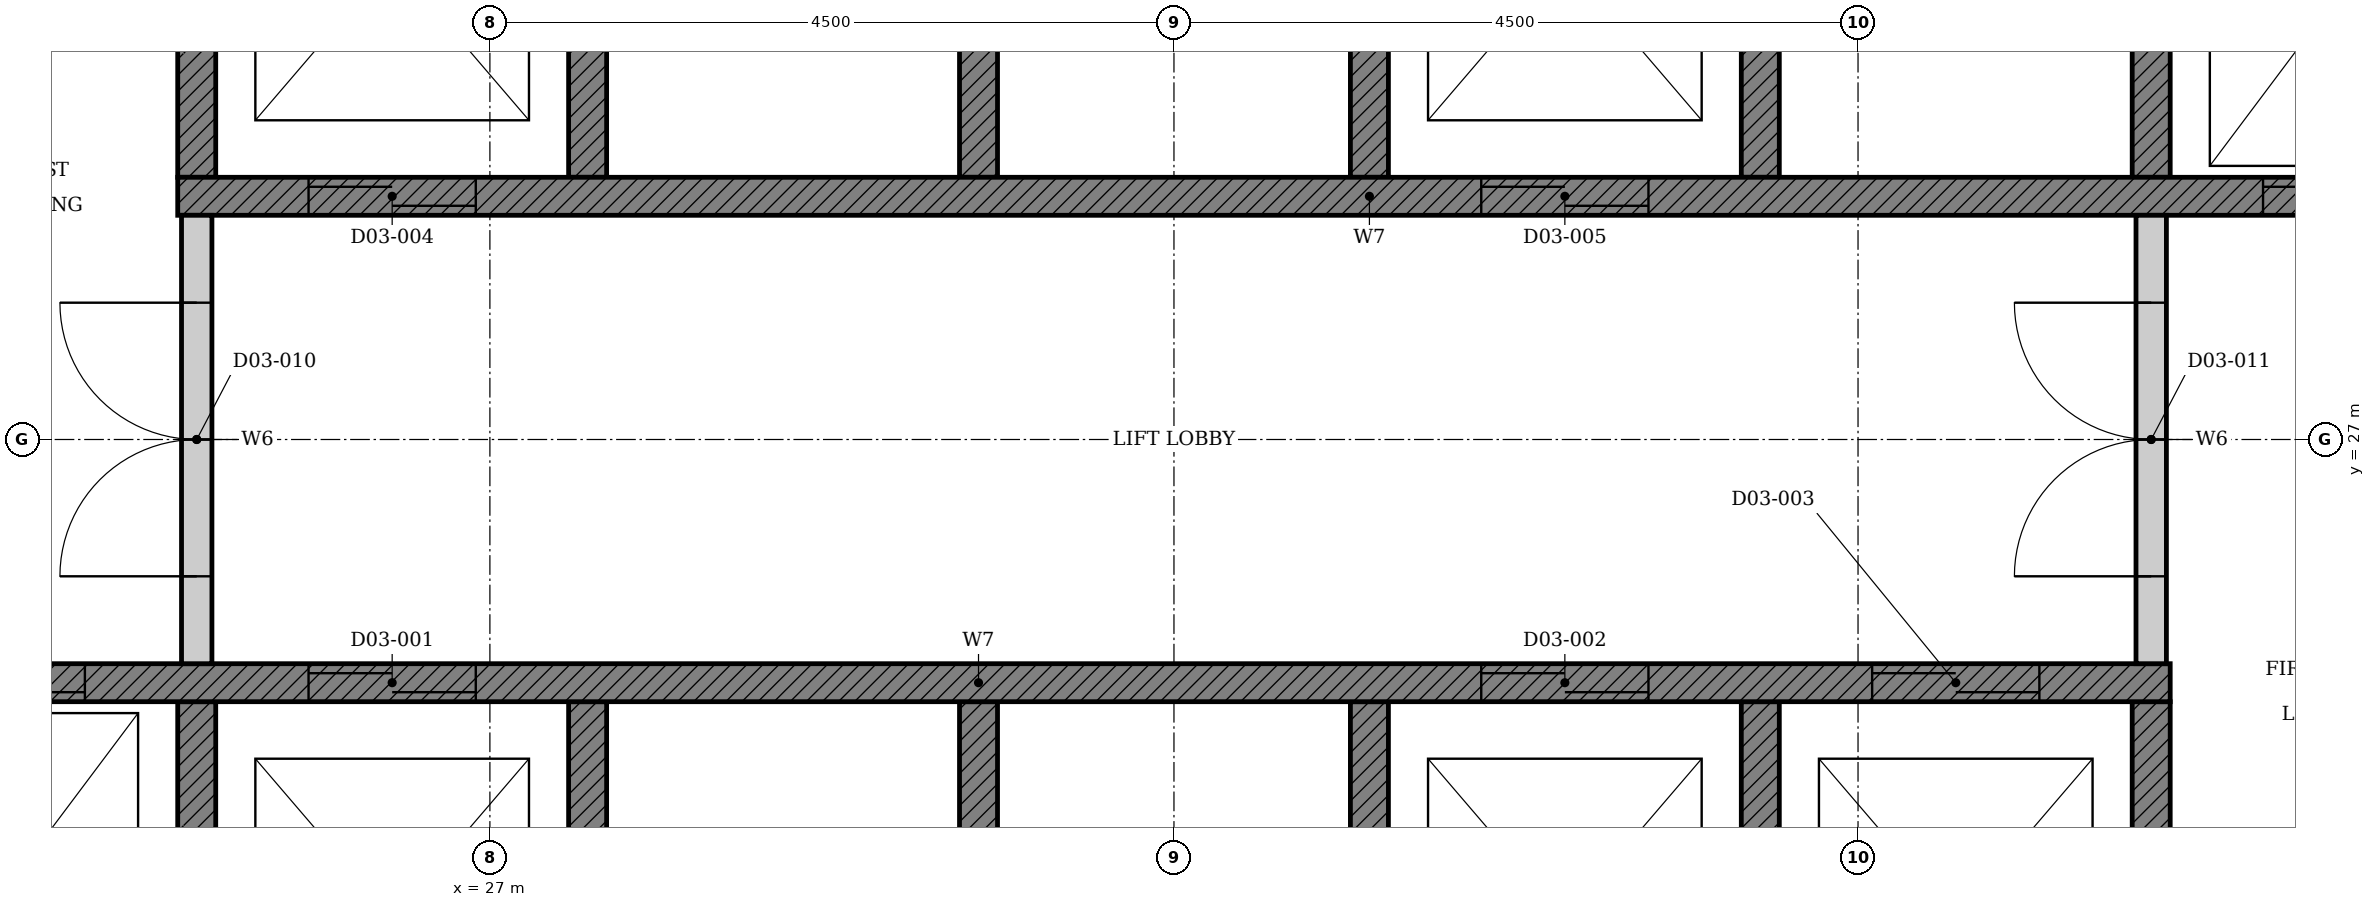
"""IFC4 building model, lengths in metres.
Left out: names, types, materials, properties, quantities, classifications, styles, units other than length and angle.
Written with IfcOpenShell. Run it as: python <this file> out.ifc"""

import sys

from ifc_helpers import new_model, si_unit, direction, frame, frame_2d, origin, place, context, subcontext, project, spatial, polyline, rectangle, outline, extrude, element, fill, save


model = new_model("IFC4")
c1 = context("Model", 3, precision=1e-05, world=origin(), true_north=direction((0.0, 1.0)))
c2 = subcontext(c1, "Body", "Model", "MODEL_VIEW")
j1 = project(units=[si_unit("LENGTHUNIT", "METRE"), si_unit("PLANEANGLEUNIT", "RADIAN")], contexts=[c1])
p1 = place(None, origin())
s1 = spatial("IfcSite", under=j1, at=p1, CompositionType="ELEMENT")
p2 = place(p1, origin())
s2 = spatial("IfcBuilding", under=s1, at=p2, CompositionType="ELEMENT")
p3 = place(p2, frame((0.0, 0.0, 17.4)))
s3 = spatial("IfcBuildingStorey", under=s2, at=p3, CompositionType="ELEMENT", Elevation=17.4)
p4 = place(p3, origin())
e1 = element("IfcWall", 1, at=p4, inside=s3, PredefinedType="SHEAR", context=c2, shape_type="SweptSolid", body=[
    extrude(outline(polyline([(22.375, 22.35), (38.053, 22.35), (38.053, 25.275), (37.803, 25.275), (37.803, 22.65), (35.482, 22.65), (35.482, 25.275), (35.232, 25.275), (35.232, 22.65), (32.911, 22.65), (32.911, 25.275), (32.661, 25.275), (32.661, 22.65), (30.339, 22.65), (30.339, 25.275), (30.089, 25.275), (30.089, 22.65), (27.768, 22.65), (27.768, 25.275), (27.518, 25.275), (27.518, 22.65), (25.197, 22.65), (25.197, 25.275), (24.947, 25.275), (24.947, 22.65), (22.625, 22.65), (22.625, 25.275), (22.375, 25.275), (22.375, 22.35)])), origin(), (0.0, 0.0, 1.0), 6.25),
])
p5 = place(p3, origin())
e2 = element("IfcWall", 2, at=p5, inside=s3, PredefinedType="SHEAR", context=c2, shape_type="SweptSolid", body=[
    extrude(outline(polyline([(24.947, 28.725), (25.197, 28.725), (25.197, 31.35), (27.518, 31.35), (27.518, 28.725), (27.768, 28.725), (27.768, 31.35), (30.089, 31.35), (30.089, 28.725), (30.339, 28.725), (30.339, 31.35), (32.661, 31.35), (32.661, 28.725), (32.911, 28.725), (32.911, 31.35), (35.232, 31.35), (35.232, 28.725), (35.482, 28.725), (35.482, 31.35), (37.803, 31.35), (37.803, 28.725), (38.053, 28.725), (38.053, 31.35), (40.375, 31.35), (40.375, 28.725), (40.625, 28.725), (40.625, 31.65), (24.947, 31.65), (24.947, 28.725)])), origin(), (0.0, 0.0, 1.0), 6.25),
])
p6 = place(p3, frame((22.375, 25.4, 0.0), z_axis=(0.0, 0.0, 1.0), x_axis=(1.0, 0.0, 0.0)))
e3 = element("IfcWall", 3, at=p6, inside=s3, PredefinedType="SHEAR", context=c2, shape_type="SweptSolid", body=[
    extrude(rectangle(XDim=15.678, YDim=0.25, at=frame_2d((7.839, 0.0))), origin(), (0.0, 0.0, 1.0), 6.25),
])
p7 = place(p6, frame((3.432, 0.0, 0.0)))
e4 = element("IfcOpeningElement", 4, at=p7, cuts=e3, PredefinedType="OPENING", context=c2, shape_type="SweptSolid", body=[
    extrude(rectangle(XDim=1.1, YDim=2.1, at=frame_2d((0.55, 1.05))), frame((0.0, 0.135, 0.0), z_axis=(0.0, -1.0, 0.0), x_axis=(1.0, 0.0, 0.0)), (0.0, 0.0, 1.0), 0.27),
])
p8 = place(p6, frame((11.146, 0.0, 0.0)))
e5 = element("IfcOpeningElement", 5, at=p8, cuts=e3, PredefinedType="OPENING", context=c2, shape_type="SweptSolid", body=[
    extrude(rectangle(XDim=1.1, YDim=2.1, at=frame_2d((0.55, 1.05))), frame((0.0, 0.135, 0.0), z_axis=(0.0, -1.0, 0.0), x_axis=(1.0, 0.0, 0.0)), (0.0, 0.0, 1.0), 0.27),
])
p9 = place(p6, frame((13.718, 0.0, 0.0)))
e6 = element("IfcOpeningElement", 6, at=p9, cuts=e3, PredefinedType="OPENING", context=c2, shape_type="SweptSolid", body=[
    extrude(rectangle(XDim=1.1, YDim=2.1, at=frame_2d((0.55, 1.05))), frame((0.0, 0.135, 0.0), z_axis=(0.0, -1.0, 0.0), x_axis=(1.0, 0.0, 0.0)), (0.0, 0.0, 1.0), 0.27),
])
p10 = place(p6, frame((0.861, 0.0, 0.0)))
e7 = element("IfcOpeningElement", 7, at=p10, cuts=e3, PredefinedType="OPENING", context=c2, shape_type="SweptSolid", body=[
    extrude(rectangle(XDim=1.1, YDim=2.1, at=frame_2d((0.55, 1.05))), frame((0.0, 0.135, 0.0), z_axis=(0.0, -1.0, 0.0), x_axis=(1.0, 0.0, 0.0)), (0.0, 0.0, 1.0), 0.27),
])
p11 = place(p3, frame((24.947, 28.6, 0.0), z_axis=(0.0, 0.0, 1.0), x_axis=(1.0, 0.0, 0.0)))
e8 = element("IfcWall", 8, at=p11, inside=s3, PredefinedType="SHEAR", context=c2, shape_type="SweptSolid", body=[
    extrude(rectangle(XDim=15.678, YDim=0.25, at=frame_2d((7.839, 0.0))), origin(), (0.0, 0.0, 1.0), 6.25),
])
p12 = place(p11, frame((0.861, 0.0, 0.0)))
e9 = element("IfcOpeningElement", 9, at=p12, cuts=e8, PredefinedType="OPENING", context=c2, shape_type="SweptSolid", body=[
    extrude(rectangle(XDim=1.1, YDim=2.1, at=frame_2d((0.55, 1.05))), frame((0.0, 0.135, 0.0), z_axis=(0.0, -1.0, 0.0), x_axis=(1.0, 0.0, 0.0)), (0.0, 0.0, 1.0), 0.27),
])
p13 = place(p11, frame((8.575, 0.0, 0.0)))
e10 = element("IfcOpeningElement", 10, at=p13, cuts=e8, PredefinedType="OPENING", context=c2, shape_type="SweptSolid", body=[
    extrude(rectangle(XDim=1.1, YDim=2.1, at=frame_2d((0.55, 1.05))), frame((0.0, 0.135, 0.0), z_axis=(0.0, -1.0, 0.0), x_axis=(1.0, 0.0, 0.0)), (0.0, 0.0, 1.0), 0.27),
])
p14 = place(p11, frame((13.718, 0.0, 0.0)))
e11 = element("IfcOpeningElement", 11, at=p14, cuts=e8, PredefinedType="OPENING", context=c2, shape_type="SweptSolid", body=[
    extrude(rectangle(XDim=1.1, YDim=2.1, at=frame_2d((0.55, 1.05))), frame((0.0, 0.135, 0.0), z_axis=(0.0, -1.0, 0.0), x_axis=(1.0, 0.0, 0.0)), (0.0, 0.0, 1.0), 0.27),
])
p15 = place(p3, frame((25.072, 25.525, 0.0), z_axis=(0.0, 0.0, 1.0), x_axis=(0.0, 1.0, 0.0)))
e12 = element("IfcWall", 12, at=p15, inside=s3, PredefinedType="PARTITIONING", context=c2, shape_type="SweptSolid", body=[
    extrude(rectangle(XDim=2.95, YDim=0.2, at=frame_2d((1.475, 0.0))), origin(), (0.0, 0.0, 1.0), 6.25),
])
p16 = place(p15, frame((0.575, 0.0, 0.0)))
e13 = element("IfcOpeningElement", 13, at=p16, cuts=e12, PredefinedType="OPENING", context=c2, shape_type="SweptSolid", body=[
    extrude(rectangle(XDim=1.8, YDim=2.1, at=frame_2d((0.9, 1.05))), frame((0.0, 0.11, 0.0), z_axis=(0.0, -1.0, 0.0), x_axis=(1.0, 0.0, 0.0)), (0.0, 0.0, 1.0), 0.22),
])
p17 = place(p3, frame((37.928, 25.525, 0.0), z_axis=(0.0, 0.0, 1.0), x_axis=(0.0, 1.0, 0.0)))
e14 = element("IfcWall", 14, at=p17, inside=s3, PredefinedType="PARTITIONING", context=c2, shape_type="SweptSolid", body=[
    extrude(rectangle(XDim=2.95, YDim=0.2, at=frame_2d((1.475, 0.0))), origin(), (0.0, 0.0, 1.0), 6.25),
])
p18 = place(p17, frame((0.575, 0.0, 0.0)))
e15 = element("IfcOpeningElement", 15, at=p18, cuts=e14, PredefinedType="OPENING", context=c2, shape_type="SweptSolid", body=[
    extrude(rectangle(XDim=1.8, YDim=2.1, at=frame_2d((0.9, 1.05))), frame((0.0, 0.11, 0.0), z_axis=(0.0, -1.0, 0.0), x_axis=(1.0, 0.0, 0.0)), (0.0, 0.0, 1.0), 0.22),
])
p19 = place(p7, origin())
e16 = element("IfcDoor", 16, at=p19, inside=s3, OperationType="DOUBLE_DOOR_SLIDING", PredefinedType="DOOR", context=c2, shape_type="SweptSolid", body=[
    extrude(rectangle(XDim=1.1, YDim=2.1, at=frame_2d((0.55, 1.05))), frame((0.0, 0.025, 0.0), z_axis=(0.0, -1.0, 0.0), x_axis=(1.0, 0.0, 0.0)), (0.0, 0.0, 1.0), 0.05),
])
fill(e4, e16)
p20 = place(p8, origin())
e17 = element("IfcDoor", 17, at=p20, inside=s3, OperationType="DOUBLE_DOOR_SLIDING", PredefinedType="DOOR", context=c2, shape_type="SweptSolid", body=[
    extrude(rectangle(XDim=1.1, YDim=2.1, at=frame_2d((0.55, 1.05))), frame((0.0, 0.025, 0.0), z_axis=(0.0, -1.0, 0.0), x_axis=(1.0, 0.0, 0.0)), (0.0, 0.0, 1.0), 0.05),
])
fill(e5, e17)
p21 = place(p9, origin())
e18 = element("IfcDoor", 18, at=p21, inside=s3, OperationType="DOUBLE_DOOR_SLIDING", PredefinedType="DOOR", context=c2, shape_type="SweptSolid", body=[
    extrude(rectangle(XDim=1.1, YDim=2.1, at=frame_2d((0.55, 1.05))), frame((0.0, 0.025, 0.0), z_axis=(0.0, -1.0, 0.0), x_axis=(1.0, 0.0, 0.0)), (0.0, 0.0, 1.0), 0.05),
])
fill(e6, e18)
p22 = place(p12, origin())
e19 = element("IfcDoor", 19, at=p22, inside=s3, OperationType="DOUBLE_DOOR_SLIDING", PredefinedType="DOOR", context=c2, shape_type="SweptSolid", body=[
    extrude(rectangle(XDim=1.1, YDim=2.1, at=frame_2d((0.55, 1.05))), frame((0.0, 0.025, 0.0), z_axis=(0.0, -1.0, 0.0), x_axis=(1.0, 0.0, 0.0)), (0.0, 0.0, 1.0), 0.05),
])
fill(e9, e19)
p23 = place(p13, origin())
e20 = element("IfcDoor", 20, at=p23, inside=s3, OperationType="DOUBLE_DOOR_SLIDING", PredefinedType="DOOR", context=c2, shape_type="SweptSolid", body=[
    extrude(rectangle(XDim=1.1, YDim=2.1, at=frame_2d((0.55, 1.05))), frame((0.0, 0.025, 0.0), z_axis=(0.0, -1.0, 0.0), x_axis=(1.0, 0.0, 0.0)), (0.0, 0.0, 1.0), 0.05),
])
fill(e10, e20)
p24 = place(p10, origin())
e21 = element("IfcDoor", 21, at=p24, inside=s3, OperationType="DOUBLE_DOOR_SLIDING", PredefinedType="DOOR", context=c2, shape_type="SweptSolid", body=[
    extrude(rectangle(XDim=1.1, YDim=2.1, at=frame_2d((0.55, 1.05))), frame((0.0, 0.025, 0.0), z_axis=(0.0, -1.0, 0.0), x_axis=(1.0, 0.0, 0.0)), (0.0, 0.0, 1.0), 0.05),
])
fill(e7, e21)
p25 = place(p14, origin())
e22 = element("IfcDoor", 22, at=p25, inside=s3, OperationType="DOUBLE_DOOR_SLIDING", PredefinedType="DOOR", context=c2, shape_type="SweptSolid", body=[
    extrude(rectangle(XDim=1.1, YDim=2.1, at=frame_2d((0.55, 1.05))), frame((0.0, 0.025, 0.0), z_axis=(0.0, -1.0, 0.0), x_axis=(1.0, 0.0, 0.0)), (0.0, 0.0, 1.0), 0.05),
])
fill(e11, e22)
p26 = place(p16, origin())
e23 = element("IfcDoor", 23, at=p26, inside=s3, OperationType="DOUBLE_DOOR_SINGLE_SWING", PredefinedType="DOOR", context=c2, shape_type="SweptSolid", body=[
    extrude(rectangle(XDim=1.8, YDim=2.1, at=frame_2d((0.9, 1.05))), frame((0.0, 0.025, 0.0), z_axis=(0.0, -1.0, 0.0), x_axis=(1.0, 0.0, 0.0)), (0.0, 0.0, 1.0), 0.05),
])
fill(e13, e23)
p27 = place(p18, origin())
e24 = element("IfcDoor", 24, at=p27, inside=s3, OperationType="DOUBLE_DOOR_SINGLE_SWING", PredefinedType="DOOR", context=c2, shape_type="SweptSolid", body=[
    extrude(rectangle(XDim=1.8, YDim=2.1, at=frame_2d((0.9, 1.05))), frame((0.0, 0.025, 0.0), z_axis=(0.0, -1.0, 0.0), x_axis=(1.0, 0.0, 0.0)), (0.0, 0.0, 1.0), 0.05),
])
fill(e15, e24)
save(model, sys.argv[1])
